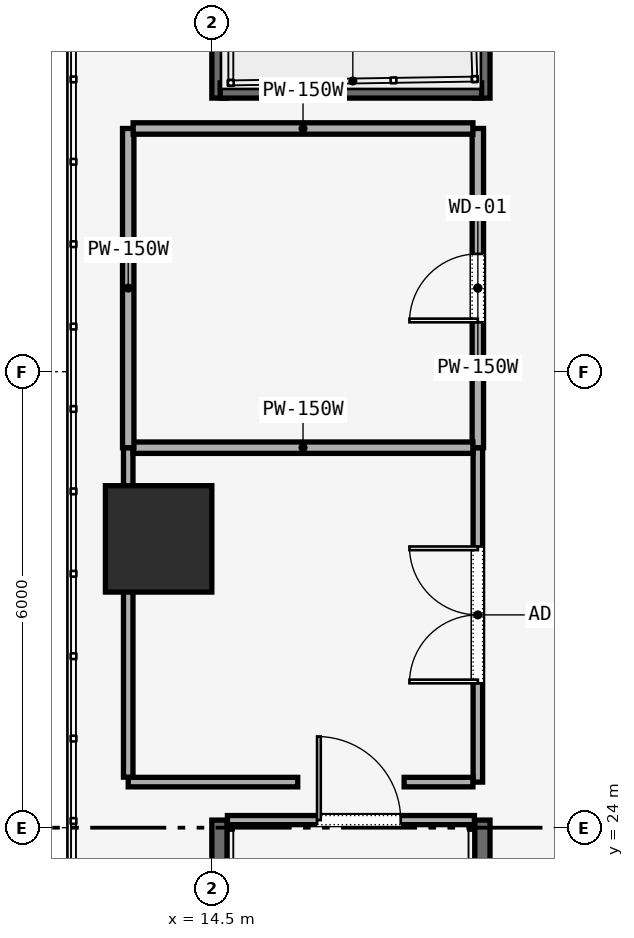
"""IFC4 building model, lengths in metres.
Left out: names, types, materials, properties, quantities, classifications, styles, units other than length and angle.
Written with IfcOpenShell. Run it as: python <this file> out.ifc"""

import sys

from ifc_helpers import new_model, si_unit, direction, frame, frame_2d, origin, origin_2d, place, context, subcontext, project, spatial, rectangle, extrude, element, fill, save


model = new_model("IFC4")
c1 = context("Model", 3, precision=1e-05, world=origin(), true_north=direction((0.0, 1.0)))
c2 = subcontext(c1, "Body", "Model", "MODEL_VIEW")
j1 = project(units=[si_unit("LENGTHUNIT", "METRE"), si_unit("PLANEANGLEUNIT", "RADIAN")], contexts=[c1])
p1 = place(None, origin())
s1 = spatial("IfcSite", under=j1, at=p1, CompositionType="ELEMENT")
p2 = place(p1, origin())
s2 = spatial("IfcBuilding", under=s1, at=p2, CompositionType="ELEMENT")
p3 = place(p2, origin())
s3 = spatial("IfcBuildingStorey", under=s2, at=p3, CompositionType="ELEMENT", Elevation=0.0)
p4 = place(p3, frame((13.8, 27.8, 0.0), z_axis=(0.0, 0.0, 1.0), x_axis=(1.0, 0.0, 0.0)))
e1 = element("IfcColumn", 1, at=p4, inside=s3, PredefinedType="COLUMN", context=c2, shape_type="SweptSolid", body=[
    extrude(rectangle(XDim=1.4, YDim=1.4, at=origin_2d()), origin(), (0.0, 0.0, 1.0), 5.7),
])
for number, where, z_axis, x_axis in (
    (2, (14.6, 24.1, -0.4), (0.0, 0.0, 1.0), (0.0, -1.0, 0.0)),
    (3, (18.06, 24.1, -0.4), (0.0, 0.0, 1.0), (0.0, -1.0, 0.0)),
):
    element("IfcWall", number, at=place(p3, frame(where, z_axis=z_axis, x_axis=x_axis)), inside=s3, PredefinedType="SOLIDWALL", context=c2, shape_type="SweptSolid", body=[
        extrude(rectangle(XDim=7.7, YDim=0.2, at=frame_2d((3.85, 0.0))), origin(), (0.0, 0.0, 1.0), 6.4),
    ])
p5 = place(p3, frame((14.705, 24.1, 0.0), z_axis=(0.0, 0.0, 1.0), x_axis=(1.0, 0.0, 0.0)))
e4 = element("IfcWall", 4, at=p5, inside=s3, PredefinedType="SOLIDWALL", context=c2, shape_type="SweptSolid", body=[
    extrude(rectangle(XDim=3.25, YDim=0.12, at=frame_2d((1.625, 0.0))), origin(), (0.0, 0.0, 1.0), 3.6),
])
p6 = place(p5, frame((1.18, 0.0, 0.0)))
e5 = element("IfcOpeningElement", 5, at=p6, cuts=e4, PredefinedType="OPENING", context=c2, shape_type="SweptSolid", body=[
    extrude(rectangle(XDim=1.1, YDim=2.2, at=frame_2d((0.55, 1.1))), frame((0.0, 0.06, 0.0), z_axis=(0.0, -1.0, 0.0), x_axis=(1.0, 0.0, 0.0)), (0.0, 0.0, 1.0), 0.12),
])
for number, where, z_axis, x_axis in (
    (6, (14.6, 41.3, -0.4), (0.0, 0.0, 1.0), (0.0, -1.0, 0.0)),
    (7, (18.06, 41.3, -0.4), (0.0, 0.0, 1.0), (0.0, -1.0, 0.0)),
):
    element("IfcWall", number, at=place(p3, frame(where, z_axis=z_axis, x_axis=x_axis)), inside=s3, PredefinedType="SOLIDWALL", context=c2, shape_type="SweptSolid", body=[
        extrude(rectangle(XDim=7.7, YDim=0.2, at=frame_2d((3.85, 0.0))), origin(), (0.0, 0.0, 1.0), 6.4),
    ])
p7 = place(p3, frame((14.61, 33.7, -0.4), z_axis=(0.0, 0.0, 1.0), x_axis=(1.0, 0.0, 0.0)))
e8 = element("IfcWall", 8, at=p7, inside=s3, PredefinedType="SOLIDWALL", context=c2, shape_type="SweptSolid", body=[
    extrude(rectangle(XDim=3.44, YDim=0.2, at=frame_2d((1.72, 0.0))), origin(), (0.0, 0.0, 1.0), 6.4),
])
p8 = place(p3, frame((18.0, 24.6, 0.0), z_axis=(0.0, 0.0, 1.0), x_axis=(0.0, 1.0, 0.0)))
e9 = element("IfcWall", 9, at=p8, inside=s3, PredefinedType="PARTITIONING", context=c2, shape_type="SweptSolid", body=[
    extrude(rectangle(XDim=4.4, YDim=0.125, at=frame_2d((2.2, 0.0))), origin(), (0.0, 0.0, 1.0), 3.6),
])
p9 = place(p8, frame((1.3, 0.0, 0.0)))
e10 = element("IfcOpeningElement", 10, at=p9, cuts=e9, PredefinedType="OPENING", context=c2, shape_type="SweptSolid", body=[
    extrude(rectangle(XDim=1.8, YDim=2.3, at=frame_2d((0.9, 1.15))), frame((0.0, 0.062, 0.0), z_axis=(0.0, -1.0, 0.0), x_axis=(1.0, 0.0, 0.0)), (0.0, 0.0, 1.0), 0.125),
])
p10 = place(p3, frame((18.0, 29.0, 0.0), z_axis=(0.0, 0.0, 1.0), x_axis=(0.0, 1.0, 0.0)))
e11 = element("IfcWall", 11, at=p10, inside=s3, PredefinedType="PARTITIONING", context=c2, shape_type="SweptSolid", body=[
    extrude(rectangle(XDim=4.2, YDim=0.15, at=frame_2d((2.1, 0.0))), origin(), (0.0, 0.0, 1.0), 3.6),
])
p11 = place(p10, frame((1.65, 0.0, 0.0)))
e12 = element("IfcOpeningElement", 12, at=p11, cuts=e11, PredefinedType="OPENING", context=c2, shape_type="SweptSolid", body=[
    extrude(rectangle(XDim=0.9, YDim=2.15, at=frame_2d((0.45, 1.075))), frame((0.0, 0.075, 0.0), z_axis=(0.0, -1.0, 0.0), x_axis=(1.0, 0.0, 0.0)), (0.0, 0.0, 1.0), 0.15),
])
p12 = place(p3, frame((17.935, 24.6, 0.0), z_axis=(0.0, 0.0, 1.0), x_axis=(-1.0, 0.0, 0.0)))
e13 = element("IfcWall", 13, at=p12, inside=s3, PredefinedType="PARTITIONING", context=c2, shape_type="SweptSolid", body=[
    extrude(rectangle(XDim=0.905, YDim=0.125, at=frame_2d((0.453, 0.0))), origin(), (0.0, 0.0, 1.0), 3.6),
])
p13 = place(p3, frame((15.63, 24.6, 0.0), z_axis=(0.0, 0.0, 1.0), x_axis=(-1.0, 0.0, 0.0)))
e14 = element("IfcWall", 14, at=p13, inside=s3, PredefinedType="PARTITIONING", context=c2, shape_type="SweptSolid", body=[
    extrude(rectangle(XDim=2.23, YDim=0.125, at=frame_2d((1.115, 0.0))), origin(), (0.0, 0.0, 1.0), 3.6),
])
p14 = place(p3, frame((13.4, 24.665, 0.0), z_axis=(0.0, 0.0, 1.0), x_axis=(0.0, 1.0, 0.0)))
e15 = element("IfcWall", 15, at=p14, inside=s3, PredefinedType="PARTITIONING", context=c2, shape_type="SweptSolid", body=[
    extrude(rectangle(XDim=4.335, YDim=0.125, at=frame_2d((2.167, 0.0))), origin(), (0.0, 0.0, 1.0), 3.6),
])
p15 = place(p3, frame((13.465, 29.0, 0.0), z_axis=(0.0, 0.0, 1.0), x_axis=(1.0, 0.0, 0.0)))
e16 = element("IfcWall", 16, at=p15, inside=s3, PredefinedType="PARTITIONING", context=c2, shape_type="SweptSolid", body=[
    extrude(rectangle(XDim=4.47, YDim=0.15, at=frame_2d((2.235, 0.0))), origin(), (0.0, 0.0, 1.0), 3.6),
])
p16 = place(p3, frame((13.4, 29.0, 0.0), z_axis=(0.0, 0.0, 1.0), x_axis=(0.0, 1.0, 0.0)))
e17 = element("IfcWall", 17, at=p16, inside=s3, PredefinedType="PARTITIONING", context=c2, shape_type="SweptSolid", body=[
    extrude(rectangle(XDim=4.2, YDim=0.15, at=frame_2d((2.1, 0.0))), origin(), (0.0, 0.0, 1.0), 3.6),
])
p17 = place(p3, frame((13.465, 33.2, 0.0), z_axis=(0.0, 0.0, 1.0), x_axis=(1.0, 0.0, 0.0)))
e18 = element("IfcWall", 18, at=p17, inside=s3, PredefinedType="PARTITIONING", context=c2, shape_type="SweptSolid", body=[
    extrude(rectangle(XDim=4.47, YDim=0.15, at=frame_2d((2.235, 0.0))), origin(), (0.0, 0.0, 1.0), 3.6),
])
p18 = place(p6, origin())
e19 = element("IfcDoor", 19, at=p18, inside=s3, OperationType="SINGLE_SWING_LEFT", PredefinedType="DOOR", context=c2, shape_type="SweptSolid", body=[
    extrude(rectangle(XDim=1.1, YDim=2.2, at=frame_2d((0.55, 1.1))), frame((0.0, 0.025, 0.0), z_axis=(0.0, -1.0, 0.0), x_axis=(1.0, 0.0, 0.0)), (0.0, 0.0, 1.0), 0.05),
])
fill(e5, e19)
p19 = place(p9, origin())
e20 = element("IfcDoor", 20, at=p19, inside=s3, OperationType="SINGLE_SWING_LEFT", PredefinedType="DOOR", context=c2, shape_type="SweptSolid", body=[
    extrude(rectangle(XDim=1.8, YDim=2.3, at=frame_2d((0.9, 1.15))), frame((0.0, 0.025, 0.0), z_axis=(0.0, -1.0, 0.0), x_axis=(1.0, 0.0, 0.0)), (0.0, 0.0, 1.0), 0.05),
])
fill(e10, e20)
p20 = place(p11, origin())
e21 = element("IfcDoor", 21, at=p20, inside=s3, OperationType="SINGLE_SWING_RIGHT", PredefinedType="DOOR", context=c2, shape_type="SweptSolid", body=[
    extrude(rectangle(XDim=0.9, YDim=2.15, at=frame_2d((0.45, 1.075))), frame((0.0, 0.025, 0.0), z_axis=(0.0, -1.0, 0.0), x_axis=(1.0, 0.0, 0.0)), (0.0, 0.0, 1.0), 0.05),
])
fill(e12, e21)
save(model, sys.argv[1])
